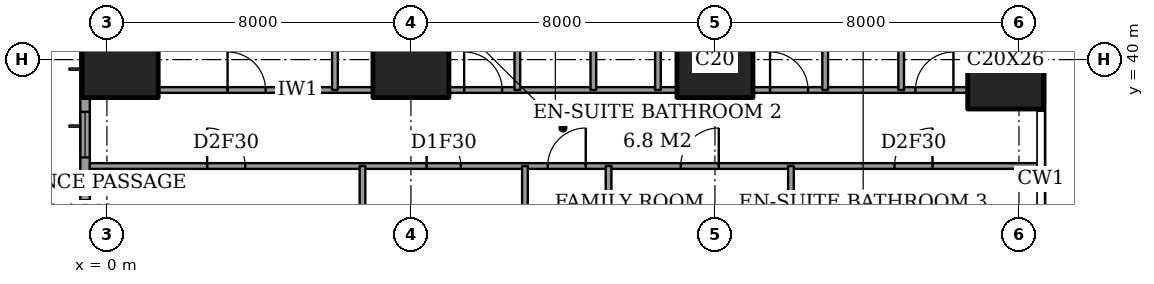
"""IFC4 building model, lengths in metres.
Left out: names, types, materials, properties, quantities, classifications, styles, units other than length and angle.
Written with IfcOpenShell. Run it as: python <this file> out.ifc"""

import sys

from ifc_helpers import new_model, si_unit, direction, frame, frame_2d, origin, origin_2d, place, context, subcontext, project, spatial, rectangle, extrude, element, fill, save


model = new_model("IFC4")
c1 = context("Model", 3, precision=1e-05, world=origin(), true_north=direction((0.0, 1.0)))
c2 = subcontext(c1, "Body", "Model", "MODEL_VIEW")
j1 = project(units=[si_unit("LENGTHUNIT", "METRE"), si_unit("PLANEANGLEUNIT", "RADIAN")], contexts=[c1])
p1 = place(None, origin())
s1 = spatial("IfcSite", under=j1, at=p1, CompositionType="ELEMENT")
p2 = place(p1, origin())
s2 = spatial("IfcBuilding", under=s1, at=p2, CompositionType="ELEMENT")
p3 = place(p2, frame((0.0, 0.0, 110.6)))
s3 = spatial("IfcBuildingStorey", under=s2, at=p3, CompositionType="ELEMENT", Elevation=110.6)
for number, where, z_axis, x_axis in (
    (1, (0.35, 40.0, 0.0), (0.0, 0.0, 1.0), (1.0, 0.0, 0.0)),
    (2, (8.0, 40.0, 0.0), (0.0, 0.0, 1.0), (1.0, 0.0, 0.0)),
    (3, (16.0, 40.0, 0.0), (0.0, 0.0, 1.0), (1.0, 0.0, 0.0)),
):
    element("IfcColumn", number, at=place(p3, frame(where, z_axis=z_axis, x_axis=x_axis)), inside=s3, PredefinedType="COLUMN", context=c2, shape_type="SweptSolid", body=[
        extrude(rectangle(XDim=2.0, YDim=2.0, at=origin_2d()), origin(), (0.0, 0.0, 1.0), 3.6),
    ])
p4 = place(p3, frame((23.65, 40.0, 0.0), z_axis=(0.0, 0.0, 1.0), x_axis=(1.0, 0.0, 0.0)))
e4 = element("IfcColumn", 4, at=p4, inside=s3, PredefinedType="COLUMN", context=c2, shape_type="SweptSolid", body=[
    extrude(rectangle(XDim=2.0, YDim=2.6, at=origin_2d()), origin(), (0.0, 0.0, 1.0), 3.6),
])
p5 = place(p3, frame((-0.575, 44.825, 0.0), z_axis=(0.0, 0.0, 1.0), x_axis=(0.0, -1.0, 0.0)))
e5 = element("IfcWall", 5, at=p5, inside=s3, PredefinedType="SOLIDWALL", context=c2, shape_type="SweptSolid", body=[
    extrude(rectangle(XDim=41.65, YDim=0.25, at=frame_2d((20.825, 0.0))), origin(), (0.0, 0.0, 1.0), 3.6),
])
p6 = place(p5, frame((0.775, 0.0, 0.4)))
e6 = element("IfcOpeningElement", 6, at=p6, cuts=e5, PredefinedType="OPENING", context=c2, shape_type="SweptSolid", body=[
    extrude(rectangle(XDim=2.4, YDim=2.2, at=frame_2d((1.2, 1.1))), frame((0.0, 0.135, 0.0), z_axis=(0.0, -1.0, 0.0), x_axis=(1.0, 0.0, 0.0)), (0.0, 0.0, 1.0), 0.27),
])
p7 = place(p5, frame((6.2, 0.0, 0.4)))
e7 = element("IfcOpeningElement", 7, at=p7, cuts=e5, PredefinedType="OPENING", context=c2, shape_type="SweptSolid", body=[
    extrude(rectangle(XDim=1.2, YDim=2.2, at=frame_2d((0.6, 1.1))), frame((0.0, 0.135, 0.0), z_axis=(0.0, -1.0, 0.0), x_axis=(1.0, 0.0, 0.0)), (0.0, 0.0, 1.0), 0.27),
])
p8 = place(p5, frame((8.525, 0.0, 0.4)))
e8 = element("IfcOpeningElement", 8, at=p8, cuts=e5, PredefinedType="OPENING", context=c2, shape_type="SweptSolid", body=[
    extrude(rectangle(XDim=2.4, YDim=2.2, at=frame_2d((1.2, 1.1))), frame((0.0, 0.135, 0.0), z_axis=(0.0, -1.0, 0.0), x_axis=(1.0, 0.0, 0.0)), (0.0, 0.0, 1.0), 0.27),
])
p9 = place(p5, frame((15.625, 0.0, 0.4)))
e9 = element("IfcOpeningElement", 9, at=p9, cuts=e5, PredefinedType="OPENING", context=c2, shape_type="SweptSolid", body=[
    extrude(rectangle(XDim=2.4, YDim=2.2, at=frame_2d((1.2, 1.1))), frame((0.0, 0.135, 0.0), z_axis=(0.0, -1.0, 0.0), x_axis=(1.0, 0.0, 0.0)), (0.0, 0.0, 1.0), 0.27),
])
p10 = place(p5, frame((23.625, 0.0, 0.4)))
e10 = element("IfcOpeningElement", 10, at=p10, cuts=e5, PredefinedType="OPENING", context=c2, shape_type="SweptSolid", body=[
    extrude(rectangle(XDim=2.4, YDim=2.2, at=frame_2d((1.2, 1.1))), frame((0.0, 0.135, 0.0), z_axis=(0.0, -1.0, 0.0), x_axis=(1.0, 0.0, 0.0)), (0.0, 0.0, 1.0), 0.27),
])
p11 = place(p5, frame((30.825, 0.0, 0.4)))
e11 = element("IfcOpeningElement", 11, at=p11, cuts=e5, PredefinedType="OPENING", context=c2, shape_type="SweptSolid", body=[
    extrude(rectangle(XDim=2.4, YDim=2.2, at=frame_2d((1.2, 1.1))), frame((0.0, 0.135, 0.0), z_axis=(0.0, -1.0, 0.0), x_axis=(1.0, 0.0, 0.0)), (0.0, 0.0, 1.0), 0.27),
])
p12 = place(p5, frame((34.5, 0.0, 0.4)))
e12 = element("IfcOpeningElement", 12, at=p12, cuts=e5, PredefinedType="OPENING", context=c2, shape_type="SweptSolid", body=[
    extrude(rectangle(XDim=1.2, YDim=2.2, at=frame_2d((0.6, 1.1))), frame((0.0, 0.135, 0.0), z_axis=(0.0, -1.0, 0.0), x_axis=(1.0, 0.0, 0.0)), (0.0, 0.0, 1.0), 0.27),
])
p13 = place(p5, frame((38.475, 0.0, 0.4)))
e13 = element("IfcOpeningElement", 13, at=p13, cuts=e5, PredefinedType="OPENING", context=c2, shape_type="SweptSolid", body=[
    extrude(rectangle(XDim=2.4, YDim=2.2, at=frame_2d((1.2, 1.1))), frame((0.0, 0.135, 0.0), z_axis=(0.0, -1.0, 0.0), x_axis=(1.0, 0.0, 0.0)), (0.0, 0.0, 1.0), 0.27),
])
p14 = place(p3, frame((-0.45, 37.2, 0.0), z_axis=(0.0, 0.0, 1.0), x_axis=(1.0, 0.0, 0.0)))
e14 = element("IfcWall", 14, at=p14, inside=s3, PredefinedType="PARTITIONING", context=c2, shape_type="SweptSolid", body=[
    extrude(rectangle(XDim=25.011, YDim=0.15, at=frame_2d((12.505, 0.0))), origin(), (0.0, 0.0, 1.0), 3.35),
])
p15 = place(p14, frame((12.05, 0.0, 0.0)))
e15 = element("IfcOpeningElement", 15, at=p15, cuts=e14, PredefinedType="OPENING", context=c2, shape_type="SweptSolid", body=[
    extrude(rectangle(XDim=1.0, YDim=2.1, at=frame_2d((0.5, 1.05))), frame((0.0, 0.085, 0.0), z_axis=(0.0, -1.0, 0.0), x_axis=(1.0, 0.0, 0.0)), (0.0, 0.0, 1.0), 0.17),
])
p16 = place(p14, frame((3.087, 0.0, 0.0)))
e16 = element("IfcOpeningElement", 16, at=p16, cuts=e14, PredefinedType="OPENING", context=c2, shape_type="SweptSolid", body=[
    extrude(rectangle(XDim=1.0, YDim=2.1, at=frame_2d((0.5, 1.05))), frame((0.0, 0.085, 0.0), z_axis=(0.0, -1.0, 0.0), x_axis=(1.0, 0.0, 0.0)), (0.0, 0.0, 1.0), 0.17),
])
p17 = place(p14, frame((8.863, 0.0, 0.0)))
e17 = element("IfcOpeningElement", 17, at=p17, cuts=e14, PredefinedType="OPENING", context=c2, shape_type="SweptSolid", body=[
    extrude(rectangle(XDim=0.9, YDim=2.1, at=frame_2d((0.45, 1.05))), frame((0.0, 0.085, 0.0), z_axis=(0.0, -1.0, 0.0), x_axis=(1.0, 0.0, 0.0)), (0.0, 0.0, 1.0), 0.17),
])
p18 = place(p14, frame((15.55, 0.0, 0.0)))
e18 = element("IfcOpeningElement", 18, at=p18, cuts=e14, PredefinedType="OPENING", context=c2, shape_type="SweptSolid", body=[
    extrude(rectangle(XDim=1.0, YDim=2.1, at=frame_2d((0.5, 1.05))), frame((0.0, 0.085, 0.0), z_axis=(0.0, -1.0, 0.0), x_axis=(1.0, 0.0, 0.0)), (0.0, 0.0, 1.0), 0.17),
])
p19 = place(p14, frame((21.175, 0.0, 0.0)))
e19 = element("IfcOpeningElement", 19, at=p19, cuts=e14, PredefinedType="OPENING", context=c2, shape_type="SweptSolid", body=[
    extrude(rectangle(XDim=1.0, YDim=2.1, at=frame_2d((0.5, 1.05))), frame((0.0, 0.085, 0.0), z_axis=(0.0, -1.0, 0.0), x_axis=(1.0, 0.0, 0.0)), (0.0, 0.0, 1.0), 0.17),
])
p20 = place(p3, frame((1.35, 39.2, 0.0), z_axis=(0.0, 0.0, 1.0), x_axis=(1.0, 0.0, 0.0)))
e20 = element("IfcWall", 20, at=p20, inside=s3, PredefinedType="PARTITIONING", context=c2, shape_type="SweptSolid", body=[
    extrude(rectangle(XDim=5.65, YDim=0.15, at=frame_2d((2.825, 0.0))), origin(), (0.0, 0.0, 1.0), 3.35),
])
p21 = place(p20, frame((1.825, 0.0, 0.0)))
e21 = element("IfcOpeningElement", 21, at=p21, cuts=e20, PredefinedType="OPENING", context=c2, shape_type="SweptSolid", body=[
    extrude(rectangle(XDim=1.0, YDim=2.1, at=frame_2d((0.5, 1.05))), frame((0.0, 0.085, 0.0), z_axis=(0.0, -1.0, 0.0), x_axis=(1.0, 0.0, 0.0)), (0.0, 0.0, 1.0), 0.17),
])
p22 = place(p3, frame((9.0, 39.2, 0.0), z_axis=(0.0, 0.0, 1.0), x_axis=(1.0, 0.0, 0.0)))
e22 = element("IfcWall", 22, at=p22, inside=s3, PredefinedType="PARTITIONING", context=c2, shape_type="SweptSolid", body=[
    extrude(rectangle(XDim=6.0, YDim=0.15, at=frame_2d((3.0, 0.0))), origin(), (0.0, 0.0, 1.0), 3.35),
])
p23 = place(p22, frame((0.4, 0.0, 0.0)))
e23 = element("IfcOpeningElement", 23, at=p23, cuts=e22, PredefinedType="OPENING", context=c2, shape_type="SweptSolid", body=[
    extrude(rectangle(XDim=1.0, YDim=2.1, at=frame_2d((0.5, 1.05))), frame((0.0, 0.085, 0.0), z_axis=(0.0, -1.0, 0.0), x_axis=(1.0, 0.0, 0.0)), (0.0, 0.0, 1.0), 0.17),
])
p24 = place(p3, frame((17.0, 39.2, 0.0), z_axis=(0.0, 0.0, 1.0), x_axis=(1.0, 0.0, 0.0)))
e24 = element("IfcWall", 24, at=p24, inside=s3, PredefinedType="PARTITIONING", context=c2, shape_type="SweptSolid", body=[
    extrude(rectangle(XDim=5.65, YDim=0.15, at=frame_2d((2.825, 0.0))), origin(), (0.0, 0.0, 1.0), 3.35),
])
p25 = place(p24, frame((0.45, 0.0, 0.0)))
e25 = element("IfcOpeningElement", 25, at=p25, cuts=e24, PredefinedType="OPENING", context=c2, shape_type="SweptSolid", body=[
    extrude(rectangle(XDim=1.0, YDim=2.1, at=frame_2d((0.5, 1.05))), frame((0.0, 0.085, 0.0), z_axis=(0.0, -1.0, 0.0), x_axis=(1.0, 0.0, 0.0)), (0.0, 0.0, 1.0), 0.17),
])
p26 = place(p24, frame((4.275, 0.0, 0.0)))
e26 = element("IfcOpeningElement", 26, at=p26, cuts=e24, PredefinedType="OPENING", context=c2, shape_type="SweptSolid", body=[
    extrude(rectangle(XDim=1.0, YDim=2.1, at=frame_2d((0.5, 1.05))), frame((0.0, 0.085, 0.0), z_axis=(0.0, -1.0, 0.0), x_axis=(1.0, 0.0, 0.0)), (0.0, 0.0, 1.0), 0.17),
])
p27 = place(p3, frame((6.0, 39.2, 0.0), z_axis=(0.0, 0.0, 1.0), x_axis=(0.0, 1.0, 0.0)))
e27 = element("IfcWall", 27, at=p27, inside=s3, PredefinedType="PARTITIONING", context=c2, shape_type="SweptSolid", body=[
    extrude(rectangle(XDim=9.25, YDim=0.15, at=frame_2d((4.625, 0.0))), origin(), (0.0, 0.0, 1.0), 3.35),
])
p28 = place(p3, frame((6.725, 33.2, 0.0), z_axis=(0.0, 0.0, 1.0), x_axis=(0.0, 1.0, 0.0)))
e28 = element("IfcWall", 28, at=p28, inside=s3, PredefinedType="PARTITIONING", context=c2, shape_type="SweptSolid", body=[
    extrude(rectangle(XDim=4.0, YDim=0.15, at=frame_2d((2.0, 0.0))), origin(), (0.0, 0.0, 1.0), 3.35),
])
p29 = place(p3, frame((10.8, 39.2, 0.0), z_axis=(0.0, 0.0, 1.0), x_axis=(0.0, 1.0, 0.0)))
e29 = element("IfcWall", 29, at=p29, inside=s3, PredefinedType="PARTITIONING", context=c2, shape_type="SweptSolid", body=[
    extrude(rectangle(XDim=3.4, YDim=0.15, at=frame_2d((1.7, 0.0))), origin(), (0.0, 0.0, 1.0), 3.35),
])
p30 = place(p29, frame((1.25, 0.0, 0.0)))
e30 = element("IfcOpeningElement", 30, at=p30, cuts=e29, PredefinedType="OPENING", context=c2, shape_type="SweptSolid", body=[
    extrude(rectangle(XDim=0.9, YDim=2.1, at=frame_2d((0.45, 1.05))), frame((0.0, 0.085, 0.0), z_axis=(0.0, -1.0, 0.0), x_axis=(1.0, 0.0, 0.0)), (0.0, 0.0, 1.0), 0.17),
])
p31 = place(p3, frame((11.0, 28.0, 0.0), z_axis=(0.0, 0.0, 1.0), x_axis=(0.0, 1.0, 0.0)))
e31 = element("IfcWall", 31, at=p31, inside=s3, PredefinedType="PARTITIONING", context=c2, shape_type="SweptSolid", body=[
    extrude(rectangle(XDim=9.2, YDim=0.15, at=frame_2d((4.6, 0.0))), origin(), (0.0, 0.0, 1.0), 3.35),
])
p32 = place(p31, frame((0.837, 0.0, 0.0)))
e32 = element("IfcOpeningElement", 32, at=p32, cuts=e31, PredefinedType="OPENING", context=c2, shape_type="SweptSolid", body=[
    extrude(rectangle(XDim=1.0, YDim=2.1, at=frame_2d((0.5, 1.05))), frame((0.0, 0.085, 0.0), z_axis=(0.0, -1.0, 0.0), x_axis=(1.0, 0.0, 0.0)), (0.0, 0.0, 1.0), 0.17),
])
p33 = place(p3, frame((12.8, 39.2, 0.0), z_axis=(0.0, 0.0, 1.0), x_axis=(0.0, 1.0, 0.0)))
e33 = element("IfcWall", 33, at=p33, inside=s3, PredefinedType="PARTITIONING", context=c2, shape_type="SweptSolid", body=[
    extrude(rectangle(XDim=9.25, YDim=0.15, at=frame_2d((4.625, 0.0))), origin(), (0.0, 0.0, 1.0), 3.35),
])
p34 = place(p33, frame((5.875, 0.0, 0.0)))
e34 = element("IfcOpeningElement", 34, at=p34, cuts=e33, PredefinedType="OPENING", context=c2, shape_type="SweptSolid", body=[
    extrude(rectangle(XDim=0.9, YDim=2.1, at=frame_2d((0.45, 1.05))), frame((0.0, 0.085, 0.0), z_axis=(0.0, -1.0, 0.0), x_axis=(1.0, 0.0, 0.0)), (0.0, 0.0, 1.0), 0.17),
])
p35 = place(p3, frame((13.2, 30.675, 0.0), z_axis=(0.0, 0.0, 1.0), x_axis=(0.0, 1.0, 0.0)))
e35 = element("IfcWall", 35, at=p35, inside=s3, PredefinedType="PARTITIONING", context=c2, shape_type="SweptSolid", body=[
    extrude(rectangle(XDim=6.525, YDim=0.15, at=frame_2d((3.262, 0.0))), origin(), (0.0, 0.0, 1.0), 3.35),
])
p36 = place(p3, frame((14.5, 39.2, 0.0), z_axis=(0.0, 0.0, 1.0), x_axis=(0.0, 1.0, 0.0)))
e36 = element("IfcWall", 36, at=p36, inside=s3, PredefinedType="PARTITIONING", context=c2, shape_type="SweptSolid", body=[
    extrude(rectangle(XDim=9.25, YDim=0.15, at=frame_2d((4.625, 0.0))), origin(), (0.0, 0.0, 1.0), 3.35),
])
p37 = place(p3, frame((18.0, 28.0, 0.0), z_axis=(0.0, 0.0, 1.0), x_axis=(0.0, 1.0, 0.0)))
e37 = element("IfcWall", 37, at=p37, inside=s3, PredefinedType="PARTITIONING", context=c2, shape_type="SweptSolid", body=[
    extrude(rectangle(XDim=9.2, YDim=0.15, at=frame_2d((4.6, 0.0))), origin(), (0.0, 0.0, 1.0), 3.35),
])
p38 = place(p37, frame((0.837, 0.0, 0.0)))
e38 = element("IfcOpeningElement", 38, at=p38, cuts=e37, PredefinedType="OPENING", context=c2, shape_type="SweptSolid", body=[
    extrude(rectangle(XDim=1.0, YDim=2.1, at=frame_2d((0.5, 1.05))), frame((0.0, 0.085, 0.0), z_axis=(0.0, -1.0, 0.0), x_axis=(1.0, 0.0, 0.0)), (0.0, 0.0, 1.0), 0.17),
])
p39 = place(p3, frame((18.9, 39.2, 0.0), z_axis=(0.0, 0.0, 1.0), x_axis=(0.0, 1.0, 0.0)))
e39 = element("IfcWall", 39, at=p39, inside=s3, PredefinedType="PARTITIONING", context=c2, shape_type="SweptSolid", body=[
    extrude(rectangle(XDim=3.7, YDim=0.15, at=frame_2d((1.85, 0.0))), origin(), (0.0, 0.0, 1.0), 3.35),
])
p40 = place(p39, frame((1.4, 0.0, 0.0)))
e40 = element("IfcOpeningElement", 40, at=p40, cuts=e39, PredefinedType="OPENING", context=c2, shape_type="SweptSolid", body=[
    extrude(rectangle(XDim=0.9, YDim=2.1, at=frame_2d((0.45, 1.05))), frame((0.0, 0.085, 0.0), z_axis=(0.0, -1.0, 0.0), x_axis=(1.0, 0.0, 0.0)), (0.0, 0.0, 1.0), 0.17),
])
p41 = place(p3, frame((20.9, 39.2, 0.0), z_axis=(0.0, 0.0, 1.0), x_axis=(0.0, 1.0, 0.0)))
e41 = element("IfcWall", 41, at=p41, inside=s3, PredefinedType="PARTITIONING", context=c2, shape_type="SweptSolid", body=[
    extrude(rectangle(XDim=9.25, YDim=0.15, at=frame_2d((4.625, 0.0))), origin(), (0.0, 0.0, 1.0), 3.35),
])
p42 = place(p7, origin())
e42 = element("IfcWindow", 42, at=p42, inside=s3, PartitioningType="SINGLE_PANEL", PredefinedType="WINDOW", context=c2, shape_type="SweptSolid", body=[
    extrude(rectangle(XDim=1.2, YDim=2.2, at=frame_2d((0.6, 1.1))), frame((0.0, 0.03, 0.0), z_axis=(0.0, -1.0, 0.0), x_axis=(1.0, 0.0, 0.0)), (0.0, 0.0, 1.0), 0.06),
])
fill(e7, e42)
p43 = place(p8, origin())
e43 = element("IfcWindow", 43, at=p43, inside=s3, PartitioningType="SINGLE_PANEL", PredefinedType="WINDOW", context=c2, shape_type="SweptSolid", body=[
    extrude(rectangle(XDim=2.4, YDim=2.2, at=frame_2d((1.2, 1.1))), frame((0.0, 0.03, 0.0), z_axis=(0.0, -1.0, 0.0), x_axis=(1.0, 0.0, 0.0)), (0.0, 0.0, 1.0), 0.06),
])
fill(e8, e43)
p44 = place(p21, origin())
e44 = element("IfcDoor", 44, at=p44, inside=s3, OperationType="SINGLE_SWING_RIGHT", PredefinedType="DOOR", context=c2, shape_type="SweptSolid", body=[
    extrude(rectangle(XDim=1.0, YDim=2.1, at=frame_2d((0.5, 1.05))), frame((0.0, 0.025, 0.0), z_axis=(0.0, -1.0, 0.0), x_axis=(1.0, 0.0, 0.0)), (0.0, 0.0, 1.0), 0.05),
])
fill(e21, e44)
p45 = place(p23, origin())
e45 = element("IfcDoor", 45, at=p45, inside=s3, OperationType="SINGLE_SWING_RIGHT", PredefinedType="DOOR", context=c2, shape_type="SweptSolid", body=[
    extrude(rectangle(XDim=1.0, YDim=2.1, at=frame_2d((0.5, 1.05))), frame((0.0, 0.025, 0.0), z_axis=(0.0, -1.0, 0.0), x_axis=(1.0, 0.0, 0.0)), (0.0, 0.0, 1.0), 0.05),
])
fill(e23, e45)
p46 = place(p25, origin())
e46 = element("IfcDoor", 46, at=p46, inside=s3, OperationType="SINGLE_SWING_RIGHT", PredefinedType="DOOR", context=c2, shape_type="SweptSolid", body=[
    extrude(rectangle(XDim=1.0, YDim=2.1, at=frame_2d((0.5, 1.05))), frame((0.0, 0.025, 0.0), z_axis=(0.0, -1.0, 0.0), x_axis=(1.0, 0.0, 0.0)), (0.0, 0.0, 1.0), 0.05),
])
fill(e25, e46)
p47 = place(p26, origin())
e47 = element("IfcDoor", 47, at=p47, inside=s3, OperationType="SINGLE_SWING_LEFT", PredefinedType="DOOR", context=c2, shape_type="SweptSolid", body=[
    extrude(rectangle(XDim=1.0, YDim=2.1, at=frame_2d((0.5, 1.05))), frame((0.0, 0.025, 0.0), z_axis=(0.0, -1.0, 0.0), x_axis=(1.0, 0.0, 0.0)), (0.0, 0.0, 1.0), 0.05),
])
fill(e26, e47)
p48 = place(p15, origin())
e48 = element("IfcDoor", 48, at=p48, inside=s3, OperationType="SINGLE_SWING_LEFT", PredefinedType="DOOR", context=c2, shape_type="SweptSolid", body=[
    extrude(rectangle(XDim=1.0, YDim=2.1, at=frame_2d((0.5, 1.05))), frame((0.0, 0.025, 0.0), z_axis=(0.0, -1.0, 0.0), x_axis=(1.0, 0.0, 0.0)), (0.0, 0.0, 1.0), 0.05),
])
fill(e15, e48)
p49 = place(p16, origin())
e49 = element("IfcDoor", 49, at=p49, inside=s3, OperationType="SINGLE_SWING_RIGHT", PredefinedType="DOOR", context=c2, shape_type="SweptSolid", body=[
    extrude(rectangle(XDim=1.0, YDim=2.1, at=frame_2d((0.5, 1.05))), frame((0.0, 0.025, 0.0), z_axis=(0.0, -1.0, 0.0), x_axis=(1.0, 0.0, 0.0)), (0.0, 0.0, 1.0), 0.05),
])
fill(e16, e49)
p50 = place(p17, origin())
e50 = element("IfcDoor", 50, at=p50, inside=s3, OperationType="SINGLE_SWING_RIGHT", PredefinedType="DOOR", context=c2, shape_type="SweptSolid", body=[
    extrude(rectangle(XDim=0.9, YDim=2.1, at=frame_2d((0.45, 1.05))), frame((0.0, 0.025, 0.0), z_axis=(0.0, -1.0, 0.0), x_axis=(1.0, 0.0, 0.0)), (0.0, 0.0, 1.0), 0.05),
])
fill(e17, e50)
p51 = place(p18, origin())
e51 = element("IfcDoor", 51, at=p51, inside=s3, OperationType="SINGLE_SWING_LEFT", PredefinedType="DOOR", context=c2, shape_type="SweptSolid", body=[
    extrude(rectangle(XDim=1.0, YDim=2.1, at=frame_2d((0.5, 1.05))), frame((0.0, 0.025, 0.0), z_axis=(0.0, -1.0, 0.0), x_axis=(1.0, 0.0, 0.0)), (0.0, 0.0, 1.0), 0.05),
])
fill(e18, e51)
p52 = place(p19, origin())
e52 = element("IfcDoor", 52, at=p52, inside=s3, OperationType="SINGLE_SWING_LEFT", PredefinedType="DOOR", context=c2, shape_type="SweptSolid", body=[
    extrude(rectangle(XDim=1.0, YDim=2.1, at=frame_2d((0.5, 1.05))), frame((0.0, 0.025, 0.0), z_axis=(0.0, -1.0, 0.0), x_axis=(1.0, 0.0, 0.0)), (0.0, 0.0, 1.0), 0.05),
])
fill(e19, e52)
save(model, sys.argv[1])
